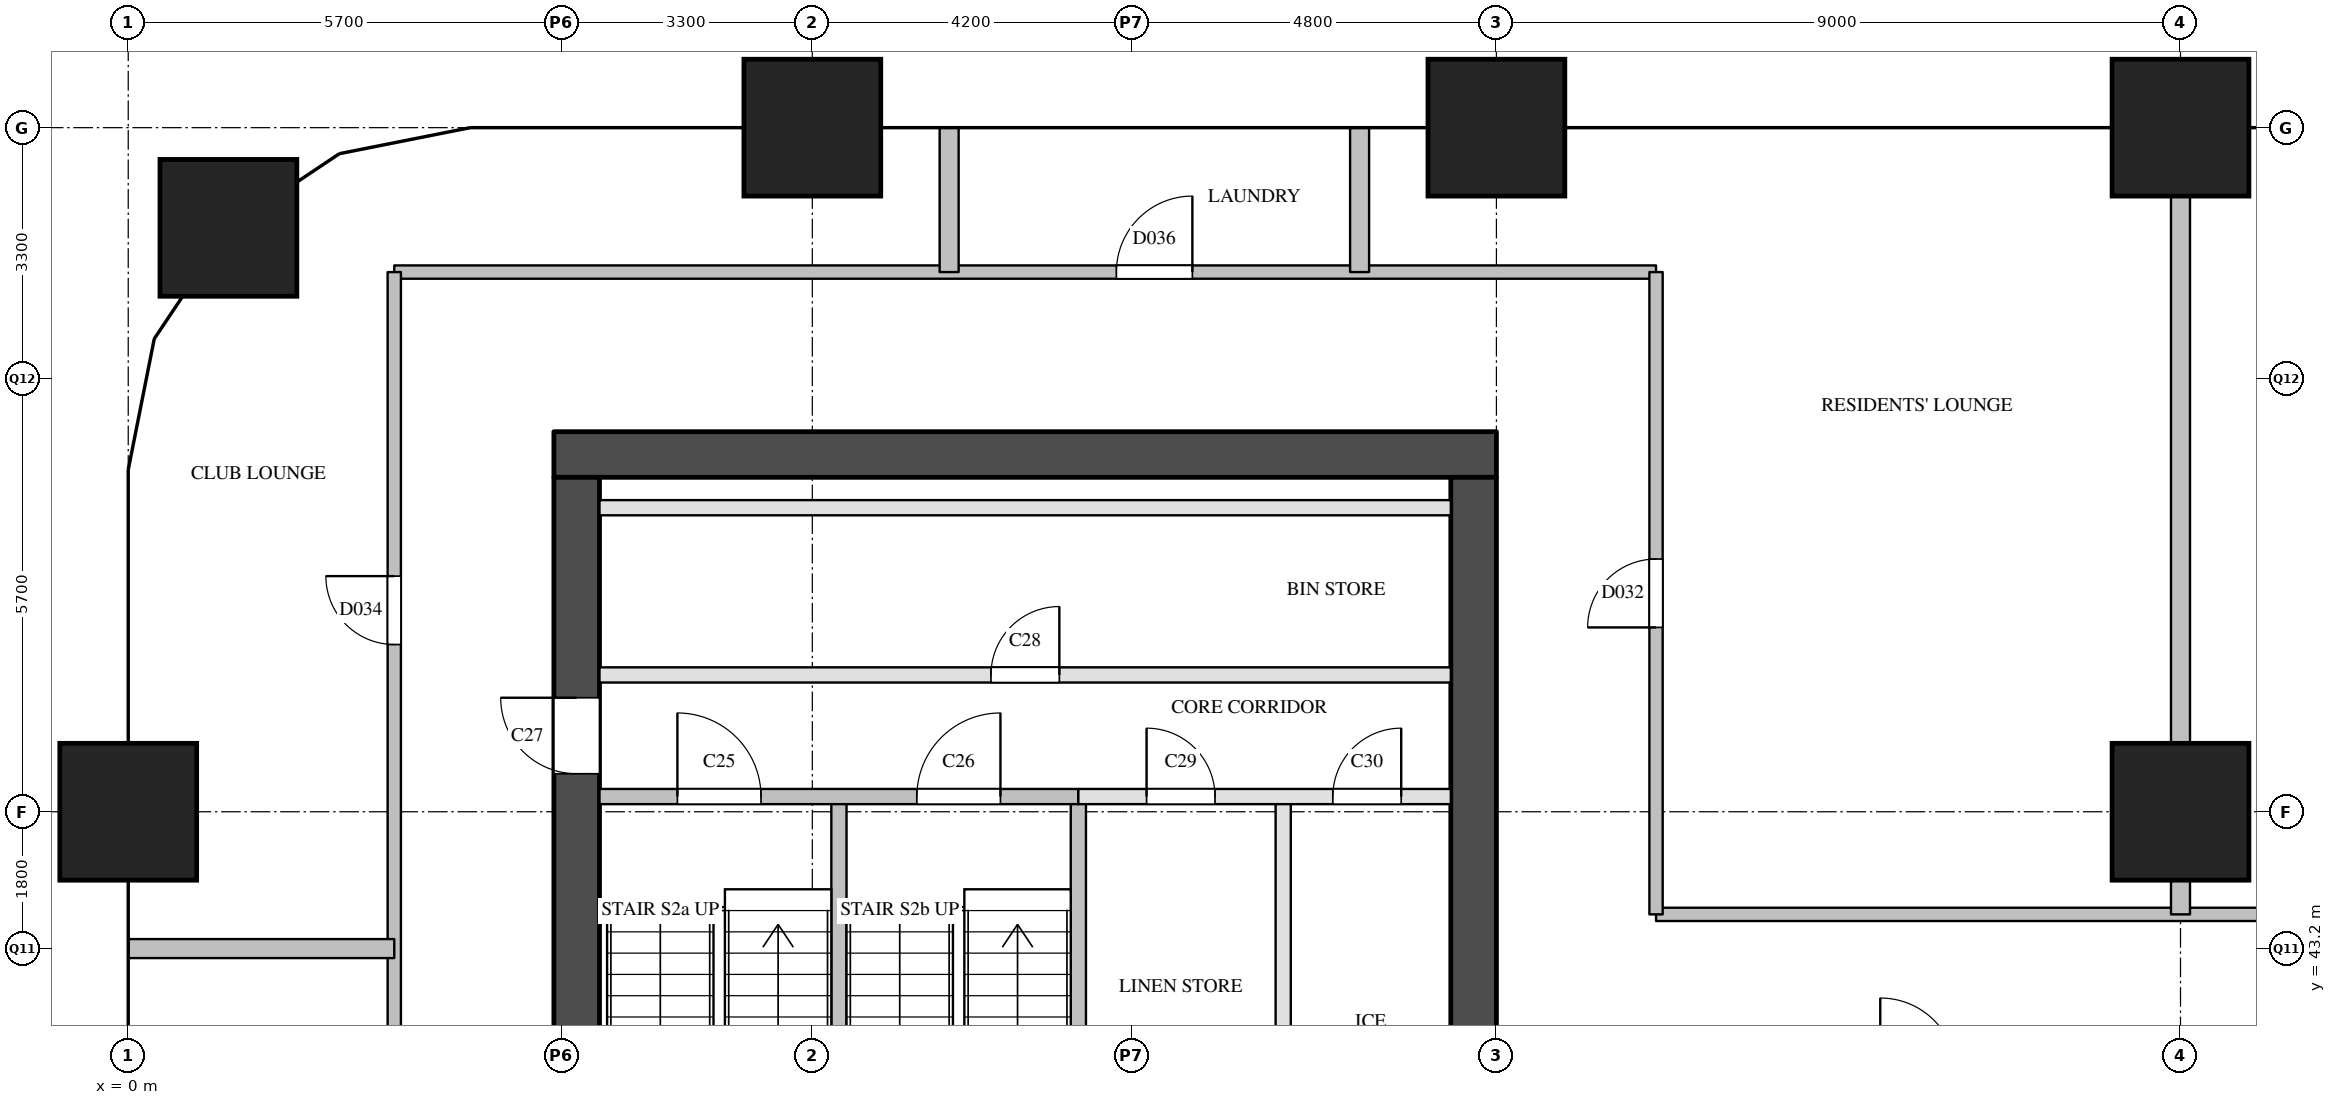
"""IFC4 building model, lengths in metres.
Left out: names, types, materials, properties, quantities, classifications, styles, units other than length and angle.
Written with IfcOpenShell. Run it as: python <this file> out.ifc"""

import sys

from ifc_helpers import new_model, si_unit, direction, frame, frame_2d, origin, origin_2d, place, context, subcontext, project, spatial, rectangle, extrude, element, fill, save


model = new_model("IFC4")
c1 = context("Model", 3, precision=1e-05, world=origin(), true_north=direction((0.0, 1.0)))
c2 = subcontext(c1, "Body", "Model", "MODEL_VIEW")
j1 = project(units=[si_unit("LENGTHUNIT", "METRE"), si_unit("PLANEANGLEUNIT", "RADIAN")], contexts=[c1])
p1 = place(None, origin())
s1 = spatial("IfcSite", under=j1, at=p1, CompositionType="ELEMENT")
p2 = place(p1, origin())
s2 = spatial("IfcBuilding", under=s1, at=p2, CompositionType="ELEMENT")
p3 = place(p2, frame((0.0, 0.0, 53.8)))
s3 = spatial("IfcBuildingStorey", under=s2, at=p3, CompositionType="ELEMENT", Elevation=53.8)
for number, where, z_axis, x_axis in (
    (1, (0.0, 45.0, 0.0), (0.0, 0.0, 1.0), (1.0, 0.0, 0.0)),
    (2, (1.318, 52.682, 0.0), (0.0, 0.0, 1.0), (1.0, 0.0, 0.0)),
    (3, (9.0, 54.0, 0.0), (0.0, 0.0, 1.0), (1.0, 0.0, 0.0)),
    (4, (18.0, 54.0, 0.0), (0.0, 0.0, 1.0), (1.0, 0.0, 0.0)),
    (5, (27.0, 45.0, 0.0), (0.0, 0.0, 1.0), (1.0, 0.0, 0.0)),
    (6, (27.0, 54.0, 0.0), (0.0, 0.0, 1.0), (1.0, 0.0, 0.0)),
):
    element("IfcColumn", number, at=place(p3, frame(where, z_axis=z_axis, x_axis=x_axis)), inside=s3, PredefinedType="COLUMN", context=c2, shape_type="SweptSolid", body=[
        extrude(rectangle(XDim=1.8, YDim=1.8, at=origin_2d()), origin(), (0.0, 0.0, 1.0), 3.8),
    ])
p4 = place(p3, frame((5.6, 49.7, 0.0), z_axis=(0.0, 0.0, 1.0), x_axis=(1.0, 0.0, 0.0)))
e7 = element("IfcWall", 7, at=p4, inside=s3, PredefinedType="SHEAR", context=c2, shape_type="SweptSolid", body=[
    extrude(rectangle(XDim=12.4, YDim=0.6, at=frame_2d((6.2, 0.0))), origin(), (0.0, 0.0, 1.0), 3.5),
])
p5 = place(p3, frame((5.9, 29.1, 0.0), z_axis=(0.0, 0.0, 1.0), x_axis=(0.0, 1.0, 0.0)))
e8 = element("IfcWall", 8, at=p5, inside=s3, PredefinedType="SHEAR", context=c2, shape_type="SweptSolid", body=[
    extrude(rectangle(XDim=20.3, YDim=0.6, at=frame_2d((10.15, 0.0))), origin(), (0.0, 0.0, 1.0), 3.5),
])
p6 = place(p5, frame((3.6, 0.0, 0.0)))
e9 = element("IfcOpeningElement", 9, at=p6, cuts=e8, PredefinedType="OPENING", context=c2, shape_type="SweptSolid", body=[
    extrude(rectangle(XDim=1.8, YDim=2.1, at=frame_2d((0.9, 1.05))), frame((0.0, 0.31, 0.0), z_axis=(0.0, -1.0, 0.0), x_axis=(1.0, 0.0, 0.0)), (0.0, 0.0, 1.0), 0.62),
])
p7 = place(p5, frame((16.4, 0.0, 0.0)))
e10 = element("IfcOpeningElement", 10, at=p7, cuts=e8, PredefinedType="OPENING", context=c2, shape_type="SweptSolid", body=[
    extrude(rectangle(XDim=1.0, YDim=2.1, at=frame_2d((0.5, 1.05))), frame((0.0, 0.31, 0.0), z_axis=(0.0, -1.0, 0.0), x_axis=(1.0, 0.0, 0.0)), (0.0, 0.0, 1.0), 0.62),
])
p8 = place(p3, frame((17.7, 29.1, 0.0), z_axis=(0.0, 0.0, 1.0), x_axis=(0.0, 1.0, 0.0)))
e11 = element("IfcWall", 11, at=p8, inside=s3, PredefinedType="SHEAR", context=c2, shape_type="SweptSolid", body=[
    extrude(rectangle(XDim=20.3, YDim=0.6, at=frame_2d((10.15, 0.0))), origin(), (0.0, 0.0, 1.0), 3.5),
])
p9 = place(p8, frame((1.25, 0.0, 0.0)))
e12 = element("IfcOpeningElement", 12, at=p9, cuts=e11, PredefinedType="OPENING", context=c2, shape_type="SweptSolid", body=[
    extrude(rectangle(XDim=0.7, YDim=2.1, at=frame_2d((0.35, 1.05))), frame((0.0, 0.31, 0.0), z_axis=(0.0, -1.0, 0.0), x_axis=(1.0, 0.0, 0.0)), (0.0, 0.0, 1.0), 0.62),
])
p10 = place(p8, frame((7.05, 0.0, 0.0)))
e13 = element("IfcOpeningElement", 13, at=p10, cuts=e11, PredefinedType="OPENING", context=c2, shape_type="SweptSolid", body=[
    extrude(rectangle(XDim=0.7, YDim=2.1, at=frame_2d((0.35, 1.05))), frame((0.0, 0.31, 0.0), z_axis=(0.0, -1.0, 0.0), x_axis=(1.0, 0.0, 0.0)), (0.0, 0.0, 1.0), 0.62),
])
for number, where, z_axis, x_axis in (
    (14, (9.35, 40.9, 0.0), (0.0, 0.0, 1.0), (0.0, 1.0, 0.0)),
    (15, (12.5, 40.9, 0.0), (0.0, 0.0, 1.0), (0.0, 1.0, 0.0)),
):
    element("IfcWall", number, at=place(p3, frame(where, z_axis=z_axis, x_axis=x_axis)), inside=s3, PredefinedType="SOLIDWALL", context=c2, shape_type="SweptSolid", body=[
        extrude(rectangle(XDim=4.3, YDim=0.2, at=frame_2d((2.15, 0.0))), origin(), (0.0, 0.0, 1.0), 3.5),
    ])
p11 = place(p3, frame((15.195, 39.0, 0.0), z_axis=(0.0, 0.0, 1.0), x_axis=(0.0, 1.0, 0.0)))
e16 = element("IfcWall", 16, at=p11, inside=s3, PredefinedType="PARTITIONING", context=c2, shape_type="SweptSolid", body=[
    extrude(rectangle(XDim=6.2, YDim=0.2, at=frame_2d((3.1, 0.0))), origin(), (0.0, 0.0, 1.0), 3.5),
])
p12 = place(p3, frame((12.5, 45.2, 0.0), z_axis=(0.0, 0.0, 1.0), x_axis=(1.0, 0.0, 0.0)))
e17 = element("IfcWall", 17, at=p12, inside=s3, PredefinedType="PARTITIONING", context=c2, shape_type="SweptSolid", body=[
    extrude(rectangle(XDim=4.9, YDim=0.2, at=frame_2d((2.45, 0.0))), origin(), (0.0, 0.0, 1.0), 3.5),
])
p13 = place(p12, frame((0.897, 0.0, 0.0)))
e18 = element("IfcOpeningElement", 18, at=p13, cuts=e17, PredefinedType="OPENING", context=c2, shape_type="SweptSolid", body=[
    extrude(rectangle(XDim=0.9, YDim=2.1, at=frame_2d((0.45, 1.05))), frame((0.0, 0.11, 0.0), z_axis=(0.0, -1.0, 0.0), x_axis=(1.0, 0.0, 0.0)), (0.0, 0.0, 1.0), 0.22),
])
p14 = place(p12, frame((3.347, 0.0, 0.0)))
e19 = element("IfcOpeningElement", 19, at=p14, cuts=e17, PredefinedType="OPENING", context=c2, shape_type="SweptSolid", body=[
    extrude(rectangle(XDim=0.9, YDim=2.1, at=frame_2d((0.45, 1.05))), frame((0.0, 0.11, 0.0), z_axis=(0.0, -1.0, 0.0), x_axis=(1.0, 0.0, 0.0)), (0.0, 0.0, 1.0), 0.22),
])
p15 = place(p3, frame((6.2, 45.2, 0.0), z_axis=(0.0, 0.0, 1.0), x_axis=(1.0, 0.0, 0.0)))
e20 = element("IfcWall", 20, at=p15, inside=s3, PredefinedType="SOLIDWALL", context=c2, shape_type="SweptSolid", body=[
    extrude(rectangle(XDim=6.3, YDim=0.2, at=frame_2d((3.15, 0.0))), origin(), (0.0, 0.0, 1.0), 3.5),
])
p16 = place(p15, frame((1.025, 0.0, 0.0)))
e21 = element("IfcOpeningElement", 21, at=p16, cuts=e20, PredefinedType="OPENING", context=c2, shape_type="SweptSolid", body=[
    extrude(rectangle(XDim=1.1, YDim=2.1, at=frame_2d((0.55, 1.05))), frame((0.0, 0.11, 0.0), z_axis=(0.0, -1.0, 0.0), x_axis=(1.0, 0.0, 0.0)), (0.0, 0.0, 1.0), 0.22),
])
p17 = place(p15, frame((4.175, 0.0, 0.0)))
e22 = element("IfcOpeningElement", 22, at=p17, cuts=e20, PredefinedType="OPENING", context=c2, shape_type="SweptSolid", body=[
    extrude(rectangle(XDim=1.1, YDim=2.1, at=frame_2d((0.55, 1.05))), frame((0.0, 0.11, 0.0), z_axis=(0.0, -1.0, 0.0), x_axis=(1.0, 0.0, 0.0)), (0.0, 0.0, 1.0), 0.22),
])
p18 = place(p3, frame((6.2, 46.8, 0.0), z_axis=(0.0, 0.0, 1.0), x_axis=(1.0, 0.0, 0.0)))
e23 = element("IfcWall", 23, at=p18, inside=s3, PredefinedType="PARTITIONING", context=c2, shape_type="SweptSolid", body=[
    extrude(rectangle(XDim=11.2, YDim=0.2, at=frame_2d((5.6, 0.0))), origin(), (0.0, 0.0, 1.0), 3.5),
])
p19 = place(p18, frame((5.15, 0.0, 0.0)))
e24 = element("IfcOpeningElement", 24, at=p19, cuts=e23, PredefinedType="OPENING", context=c2, shape_type="SweptSolid", body=[
    extrude(rectangle(XDim=0.9, YDim=2.1, at=frame_2d((0.45, 1.05))), frame((0.0, 0.11, 0.0), z_axis=(0.0, -1.0, 0.0), x_axis=(1.0, 0.0, 0.0)), (0.0, 0.0, 1.0), 0.22),
])
p20 = place(p3, frame((6.2, 49.0, 0.0), z_axis=(0.0, 0.0, 1.0), x_axis=(1.0, 0.0, 0.0)))
e25 = element("IfcWall", 25, at=p20, inside=s3, PredefinedType="PARTITIONING", context=c2, shape_type="SweptSolid", body=[
    extrude(rectangle(XDim=11.2, YDim=0.2, at=frame_2d((5.6, 0.0))), origin(), (0.0, 0.0, 1.0), 3.5),
])
p21 = place(p3, frame((20.1, 43.65, 0.0), z_axis=(0.0, 0.0, 1.0), x_axis=(1.0, 0.0, 0.0)))
e26 = element("IfcWall", 26, at=p21, inside=s3, PredefinedType="PARTITIONING", context=c2, shape_type="SweptSolid", body=[
    extrude(rectangle(XDim=13.8, YDim=0.175, at=frame_2d((6.9, 0.0))), origin(), (0.0, 0.0, 1.0), 2.5),
])
p22 = place(p3, frame((3.5, 52.1, 0.0), z_axis=(0.0, 0.0, 1.0), x_axis=(1.0, 0.0, 0.0)))
e27 = element("IfcWall", 27, at=p22, inside=s3, PredefinedType="PARTITIONING", context=c2, shape_type="SweptSolid", body=[
    extrude(rectangle(XDim=16.6, YDim=0.175, at=frame_2d((8.3, 0.0))), origin(), (0.0, 0.0, 1.0), 3.5),
])
p23 = place(p22, frame((9.5, 0.0, 0.0)))
e28 = element("IfcOpeningElement", 28, at=p23, cuts=e27, PredefinedType="OPENING", context=c2, shape_type="SweptSolid", body=[
    extrude(rectangle(XDim=1.0, YDim=2.1, at=frame_2d((0.5, 1.05))), frame((0.0, 0.097, 0.0), z_axis=(0.0, -1.0, 0.0), x_axis=(1.0, 0.0, 0.0)), (0.0, 0.0, 1.0), 0.195),
])
p24 = place(p3, frame((3.5, 26.4, 0.0), z_axis=(0.0, 0.0, 1.0), x_axis=(0.0, 1.0, 0.0)))
e29 = element("IfcWall", 29, at=p24, inside=s3, PredefinedType="PARTITIONING", context=c2, shape_type="SweptSolid", body=[
    extrude(rectangle(XDim=25.7, YDim=0.175, at=frame_2d((12.85, 0.0))), origin(), (0.0, 0.0, 1.0), 2.5),
])
p25 = place(p24, frame((5.55, 0.0, 0.0)))
e30 = element("IfcOpeningElement", 30, at=p25, cuts=e29, PredefinedType="OPENING", context=c2, shape_type="SweptSolid", body=[
    extrude(rectangle(XDim=0.9, YDim=2.1, at=frame_2d((0.45, 1.05))), frame((0.0, 0.097, 0.0), z_axis=(0.0, -1.0, 0.0), x_axis=(1.0, 0.0, 0.0)), (0.0, 0.0, 1.0), 0.195),
])
p26 = place(p24, frame((13.65, 0.0, 0.0)))
e31 = element("IfcOpeningElement", 31, at=p26, cuts=e29, PredefinedType="OPENING", context=c2, shape_type="SweptSolid", body=[
    extrude(rectangle(XDim=0.9, YDim=2.1, at=frame_2d((0.45, 1.05))), frame((0.0, 0.097, 0.0), z_axis=(0.0, -1.0, 0.0), x_axis=(1.0, 0.0, 0.0)), (0.0, 0.0, 1.0), 0.195),
])
p27 = place(p24, frame((20.8, 0.0, 0.0)))
e32 = element("IfcOpeningElement", 32, at=p27, cuts=e29, PredefinedType="OPENING", context=c2, shape_type="SweptSolid", body=[
    extrude(rectangle(XDim=0.9, YDim=2.1, at=frame_2d((0.45, 1.05))), frame((0.0, 0.097, 0.0), z_axis=(0.0, -1.0, 0.0), x_axis=(1.0, 0.0, 0.0)), (0.0, 0.0, 1.0), 0.195),
])
p28 = place(p3, frame((20.1, 43.65, 0.0), z_axis=(0.0, 0.0, 1.0), x_axis=(0.0, 1.0, 0.0)))
e33 = element("IfcWall", 33, at=p28, inside=s3, PredefinedType="PARTITIONING", context=c2, shape_type="SweptSolid", body=[
    extrude(rectangle(XDim=8.45, YDim=0.175, at=frame_2d((4.225, 0.0))), origin(), (0.0, 0.0, 1.0), 3.5),
])
p29 = place(p28, frame((3.775, 0.0, 0.0)))
e34 = element("IfcOpeningElement", 34, at=p29, cuts=e33, PredefinedType="OPENING", context=c2, shape_type="SweptSolid", body=[
    extrude(rectangle(XDim=0.9, YDim=2.1, at=frame_2d((0.45, 1.05))), frame((0.0, 0.097, 0.0), z_axis=(0.0, -1.0, 0.0), x_axis=(1.0, 0.0, 0.0)), (0.0, 0.0, 1.0), 0.195),
])
p30 = place(p3, frame((0.0, 43.2, 0.0), z_axis=(0.0, 0.0, 1.0), x_axis=(1.0, 0.0, 0.0)))
e35 = element("IfcWall", 35, at=p30, inside=s3, PredefinedType="PARTITIONING", context=c2, shape_type="SweptSolid", body=[
    extrude(rectangle(XDim=3.5, YDim=0.25, at=frame_2d((1.75, 0.0))), origin(), (0.0, 0.0, 1.0), 2.5),
])
for number, where, z_axis, x_axis in (
    (36, (10.8, 52.1, 0.0), (0.0, 0.0, 1.0), (0.0, 1.0, 0.0)),
    (37, (16.2, 52.1, 0.0), (0.0, 0.0, 1.0), (0.0, 1.0, 0.0)),
):
    element("IfcWall", number, at=place(p3, frame(where, z_axis=z_axis, x_axis=x_axis)), inside=s3, PredefinedType="PARTITIONING", context=c2, shape_type="SweptSolid", body=[
        extrude(rectangle(XDim=1.9, YDim=0.25, at=frame_2d((0.95, 0.0))), origin(), (0.0, 0.0, 1.0), 2.5),
    ])
p31 = place(p3, frame((27.0, 43.65, 0.0), z_axis=(0.0, 0.0, 1.0), x_axis=(0.0, 1.0, 0.0)))
e38 = element("IfcWall", 38, at=p31, inside=s3, PredefinedType="PARTITIONING", context=c2, shape_type="SweptSolid", body=[
    extrude(rectangle(XDim=10.35, YDim=0.25, at=frame_2d((5.175, 0.0))), origin(), (0.0, 0.0, 1.0), 2.5),
])
p32 = place(p16, origin())
e39 = element("IfcDoor", 39, at=p32, inside=s3, OperationType="SINGLE_SWING_LEFT", PredefinedType="DOOR", context=c2, shape_type="SweptSolid", body=[
    extrude(rectangle(XDim=1.1, YDim=2.1, at=frame_2d((0.55, 1.05))), frame((0.0, 0.025, 0.0), z_axis=(0.0, -1.0, 0.0), x_axis=(1.0, 0.0, 0.0)), (0.0, 0.0, 1.0), 0.05),
])
fill(e21, e39)
p33 = place(p17, origin())
e40 = element("IfcDoor", 40, at=p33, inside=s3, OperationType="SINGLE_SWING_RIGHT", PredefinedType="DOOR", context=c2, shape_type="SweptSolid", body=[
    extrude(rectangle(XDim=1.1, YDim=2.1, at=frame_2d((0.55, 1.05))), frame((0.0, 0.025, 0.0), z_axis=(0.0, -1.0, 0.0), x_axis=(1.0, 0.0, 0.0)), (0.0, 0.0, 1.0), 0.05),
])
fill(e22, e40)
p34 = place(p7, origin())
e41 = element("IfcDoor", 41, at=p34, inside=s3, OperationType="SINGLE_SWING_RIGHT", PredefinedType="DOOR", context=c2, shape_type="SweptSolid", body=[
    extrude(rectangle(XDim=1.0, YDim=2.1, at=frame_2d((0.5, 1.05))), frame((0.0, 0.025, 0.0), z_axis=(0.0, -1.0, 0.0), x_axis=(1.0, 0.0, 0.0)), (0.0, 0.0, 1.0), 0.05),
])
fill(e10, e41)
p35 = place(p19, origin())
e42 = element("IfcDoor", 42, at=p35, inside=s3, OperationType="SINGLE_SWING_RIGHT", PredefinedType="DOOR", context=c2, shape_type="SweptSolid", body=[
    extrude(rectangle(XDim=0.9, YDim=2.1, at=frame_2d((0.45, 1.05))), frame((0.0, 0.025, 0.0), z_axis=(0.0, -1.0, 0.0), x_axis=(1.0, 0.0, 0.0)), (0.0, 0.0, 1.0), 0.05),
])
fill(e24, e42)
p36 = place(p13, origin())
e43 = element("IfcDoor", 43, at=p36, inside=s3, OperationType="SINGLE_SWING_LEFT", PredefinedType="DOOR", context=c2, shape_type="SweptSolid", body=[
    extrude(rectangle(XDim=0.9, YDim=2.1, at=frame_2d((0.45, 1.05))), frame((0.0, 0.025, 0.0), z_axis=(0.0, -1.0, 0.0), x_axis=(1.0, 0.0, 0.0)), (0.0, 0.0, 1.0), 0.05),
])
fill(e18, e43)
p37 = place(p14, origin())
e44 = element("IfcDoor", 44, at=p37, inside=s3, OperationType="SINGLE_SWING_RIGHT", PredefinedType="DOOR", context=c2, shape_type="SweptSolid", body=[
    extrude(rectangle(XDim=0.9, YDim=2.1, at=frame_2d((0.45, 1.05))), frame((0.0, 0.025, 0.0), z_axis=(0.0, -1.0, 0.0), x_axis=(1.0, 0.0, 0.0)), (0.0, 0.0, 1.0), 0.05),
])
fill(e19, e44)
p38 = place(p29, origin())
e45 = element("IfcDoor", 45, at=p38, inside=s3, OperationType="SINGLE_SWING_LEFT", PredefinedType="DOOR", context=c2, shape_type="SweptSolid", body=[
    extrude(rectangle(XDim=0.9, YDim=2.1, at=frame_2d((0.45, 1.05))), frame((0.0, 0.025, 0.0), z_axis=(0.0, -1.0, 0.0), x_axis=(1.0, 0.0, 0.0)), (0.0, 0.0, 1.0), 0.05),
])
fill(e34, e45)
p39 = place(p27, origin())
e46 = element("IfcDoor", 46, at=p39, inside=s3, OperationType="SINGLE_SWING_RIGHT", PredefinedType="DOOR", context=c2, shape_type="SweptSolid", body=[
    extrude(rectangle(XDim=0.9, YDim=2.1, at=frame_2d((0.45, 1.05))), frame((0.0, 0.025, 0.0), z_axis=(0.0, -1.0, 0.0), x_axis=(1.0, 0.0, 0.0)), (0.0, 0.0, 1.0), 0.05),
])
fill(e32, e46)
p40 = place(p23, origin())
e47 = element("IfcDoor", 47, at=p40, inside=s3, OperationType="SINGLE_SWING_RIGHT", PredefinedType="DOOR", context=c2, shape_type="SweptSolid", body=[
    extrude(rectangle(XDim=1.0, YDim=2.1, at=frame_2d((0.5, 1.05))), frame((0.0, 0.025, 0.0), z_axis=(0.0, -1.0, 0.0), x_axis=(1.0, 0.0, 0.0)), (0.0, 0.0, 1.0), 0.05),
])
fill(e28, e47)
save(model, sys.argv[1])
